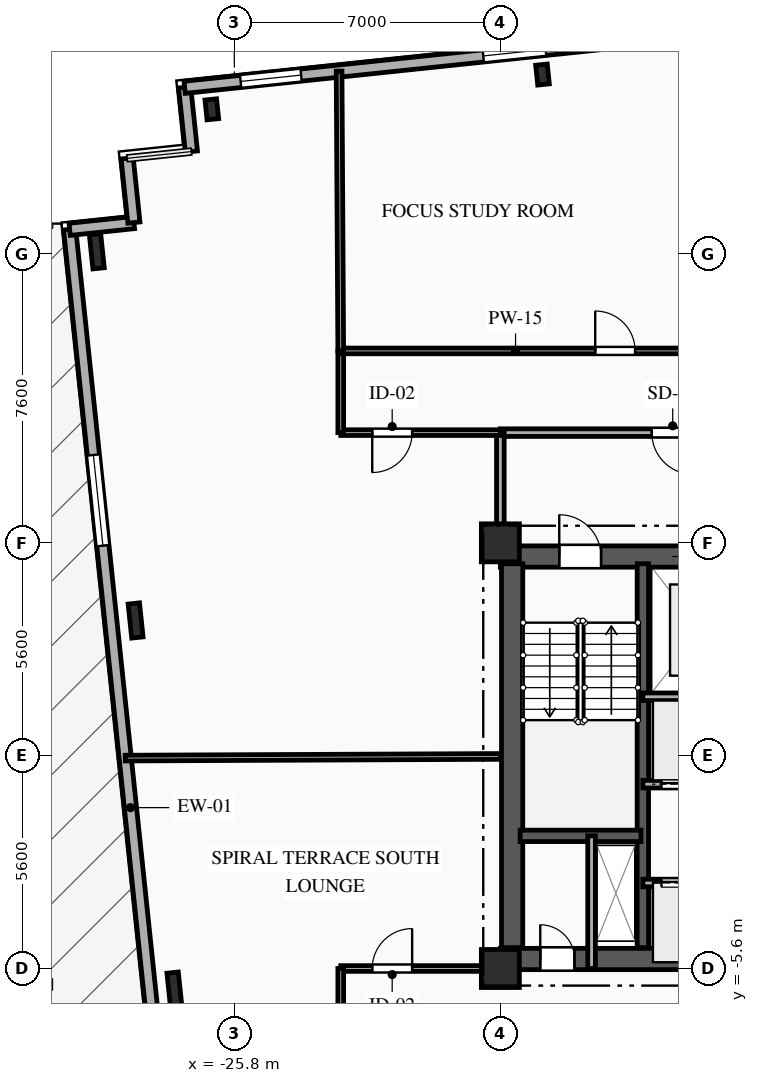
"""IFC4 building model, lengths in metres.
Left out: names, types, materials, properties, quantities, classifications, styles, units other than length and angle.
Written with IfcOpenShell. Run it as: python <this file> out.ifc"""

import sys

from ifc_helpers import new_model, si_unit, direction, frame, frame_2d, origin, origin_2d, place, context, subcontext, project, spatial, rectangle, i_section, extrude, element, fill, save


model = new_model("IFC4")
c1 = context("Model", 3, precision=1e-05, world=origin(), true_north=direction((0.0, 1.0)))
c2 = subcontext(c1, "Body", "Model", "MODEL_VIEW")
j1 = project(units=[si_unit("LENGTHUNIT", "METRE"), si_unit("PLANEANGLEUNIT", "RADIAN")], contexts=[c1])
p1 = place(None, origin())
s1 = spatial("IfcSite", under=j1, at=p1, CompositionType="ELEMENT")
p2 = place(p1, origin())
s2 = spatial("IfcBuilding", under=s1, at=p2, CompositionType="ELEMENT")
p3 = place(p2, frame((0.0, 0.0, 79.0)))
s3 = spatial("IfcBuildingStorey", under=s2, at=p3, CompositionType="ELEMENT", Elevation=79.0)
for number, where, z_axis, x_axis in (
    (1, (-18.8, -5.6, 0.0), (0.0, 0.0, 1.0), (1.0, 0.0, 0.0)),
    (2, (-18.8, 5.6, 0.0), (0.0, 0.0, 1.0), (1.0, 0.0, 0.0)),
):
    element("IfcColumn", number, at=place(p3, frame(where, z_axis=z_axis, x_axis=x_axis)), inside=s3, PredefinedType="COLUMN", context=c2, shape_type="SweptSolid", body=[
        extrude(rectangle(XDim=1.0, YDim=1.0, at=origin_2d()), origin(), (0.0, 0.0, 1.0), 3.35),
    ])
for number, where, z_axis, x_axis in (
    (3, (-17.691, 17.922, 0.0), (0.0, 0.0, 1.0), (0.995, 0.105, 0.0)),
    (4, (-26.393, 17.007, 0.0), (0.0, 0.0, 1.0), (0.995, 0.105, 0.0)),
):
    element("IfcColumn", number, at=place(p3, frame(where, z_axis=z_axis, x_axis=x_axis)), inside=s3, PredefinedType="COLUMN", context=c2, shape_type="SweptSolid", body=[
        extrude(i_section(OverallWidth=0.306, OverallDepth=0.524, WebThickness=0.021, FlangeThickness=0.04, FilletRadius=0.027, at=origin_2d()), origin(), (0.0, 0.0, 1.0), 3.35),
    ])
for number, where, z_axis, x_axis in (
    (5, (-29.419, 13.271, 0.0), (0.0, 0.0, 1.0), (0.995, 0.105, 0.0)),
    (6, (-28.398, 3.557, 0.0), (0.0, 0.0, 1.0), (0.995, 0.105, 0.0)),
    (7, (-27.377, -6.156, 0.0), (0.0, 0.0, 1.0), (0.995, 0.105, 0.0)),
):
    element("IfcColumn", number, at=place(p3, frame(where, z_axis=z_axis, x_axis=x_axis)), inside=s3, PredefinedType="COLUMN", context=c2, shape_type="SweptSolid", body=[
        extrude(i_section(OverallWidth=0.3, OverallDepth=0.9, WebThickness=0.019, FlangeThickness=0.035, FilletRadius=0.03, at=origin_2d()), origin(), (0.0, 0.0, 1.0), 3.35),
    ])
p4 = place(p3, frame((-26.935, -16.583, 0.0), z_axis=(0.0, 0.0, 1.0), x_axis=(-0.104524887486, 0.994522271192, 0.0)))
e8 = element("IfcWall", 8, at=p4, inside=s3, PredefinedType="SOLIDWALL", context=c2, shape_type="SweptSolid", body=[
    extrude(rectangle(XDim=30.6, YDim=0.32, at=frame_2d((15.3, 0.0))), origin(), (0.0, 0.0, 1.0), 3.045),
])
p5 = place(p4, frame((1.65, 0.0, 0.0)))
e9 = element("IfcOpeningElement", 9, at=p5, cuts=e8, PredefinedType="OPENING", context=c2, shape_type="SweptSolid", body=[
    extrude(rectangle(XDim=1.2, YDim=2.2, at=frame_2d((0.6, 1.1))), frame((0.0, 0.17, 0.0), z_axis=(0.0, -1.0, 0.0), x_axis=(1.0, 0.0, 0.0)), (0.0, 0.0, 1.0), 0.34),
])
p6 = place(p4, frame((7.371, 0.0, 0.85)))
e10 = element("IfcOpeningElement", 10, at=p6, cuts=e8, PredefinedType="OPENING", context=c2, shape_type="SweptSolid", body=[
    extrude(rectangle(XDim=2.4, YDim=1.95, at=frame_2d((1.2, 0.975))), frame((0.0, 0.17, 0.0), z_axis=(0.0, -1.0, 0.0), x_axis=(1.0, 0.0, 0.0)), (0.0, 0.0, 1.0), 0.34),
])
p7 = place(p4, frame((22.231, 0.0, 0.85)))
e11 = element("IfcOpeningElement", 11, at=p7, cuts=e8, PredefinedType="OPENING", context=c2, shape_type="SweptSolid", body=[
    extrude(rectangle(XDim=2.4, YDim=1.95, at=frame_2d((1.2, 0.975))), frame((0.0, 0.17, 0.0), z_axis=(0.0, -1.0, 0.0), x_axis=(1.0, 0.0, 0.0)), (0.0, 0.0, 1.0), 0.34),
])
for number, where, z_axis, x_axis in (
    (12, (-30.133, 13.849, 0.0), (0.0, 0.0, 1.0), (0.995, 0.104, 0.0)),
    (13, (-28.443, 14.027, 0.0), (0.0, 0.0, 1.0), (-0.105, 0.995, 0.0)),
    (14, (-26.93, 15.895, 0.0), (0.0, 0.0, 1.0), (-0.105, 0.995, 0.0)),
):
    element("IfcWall", number, at=place(p3, frame(where, z_axis=z_axis, x_axis=x_axis)), inside=s3, PredefinedType="SOLIDWALL", context=c2, shape_type="SweptSolid", body=[
        extrude(rectangle(XDim=1.7, YDim=0.32, at=frame_2d((0.85, 0.0))), origin(), (0.0, 0.0, 1.0), 3.045),
    ])
p8 = place(p3, frame((-27.107, 17.586, 0.0), z_axis=(0.0, 0.0, 1.0), x_axis=(0.994521628355, 0.104531003701, 0.0)))
e15 = element("IfcWall", 15, at=p8, inside=s3, PredefinedType="SOLIDWALL", context=c2, shape_type="SweptSolid", body=[
    extrude(rectangle(XDim=53.8, YDim=0.32, at=frame_2d((26.9, 0.0))), origin(), (0.0, 0.0, 1.0), 3.045),
])
p9 = place(p8, frame((1.482, 0.0, 0.85)))
e16 = element("IfcOpeningElement", 16, at=p9, cuts=e15, PredefinedType="OPENING", context=c2, shape_type="SweptSolid", body=[
    extrude(rectangle(XDim=1.6, YDim=1.85, at=frame_2d((0.8, 0.925))), frame((0.0, 0.17, 0.0), z_axis=(0.0, -1.0, 0.0), x_axis=(1.0, 0.0, 0.0)), (0.0, 0.0, 1.0), 0.34),
])
p10 = place(p8, frame((7.902, 0.0, 0.85)))
e17 = element("IfcOpeningElement", 17, at=p10, cuts=e15, PredefinedType="OPENING", context=c2, shape_type="SweptSolid", body=[
    extrude(rectangle(XDim=1.65, YDim=1.85, at=frame_2d((0.825, 0.925))), frame((0.0, 0.17, 0.0), z_axis=(0.0, -1.0, 0.0), x_axis=(1.0, 0.0, 0.0)), (0.0, 0.0, 1.0), 0.34),
])
p11 = place(p8, frame((18.374, 0.0, 0.85)))
e18 = element("IfcOpeningElement", 18, at=p11, cuts=e15, PredefinedType="OPENING", context=c2, shape_type="SweptSolid", body=[
    extrude(rectangle(XDim=1.6, YDim=1.85, at=frame_2d((0.8, 0.925))), frame((0.0, 0.17, 0.0), z_axis=(0.0, -1.0, 0.0), x_axis=(1.0, 0.0, 0.0)), (0.0, 0.0, 1.0), 0.34),
])
p12 = place(p8, frame((26.16, 0.0, 0.85)))
e19 = element("IfcOpeningElement", 19, at=p12, cuts=e15, PredefinedType="OPENING", context=c2, shape_type="SweptSolid", body=[
    extrude(rectangle(XDim=2.2, YDim=1.85, at=frame_2d((1.1, 0.925))), frame((0.0, 0.17, 0.0), z_axis=(0.0, -1.0, 0.0), x_axis=(1.0, 0.0, 0.0)), (0.0, 0.0, 1.0), 0.34),
])
p13 = place(p8, frame((35.407, 0.0, 0.85)))
e20 = element("IfcOpeningElement", 20, at=p13, cuts=e15, PredefinedType="OPENING", context=c2, shape_type="SweptSolid", body=[
    extrude(rectangle(XDim=2.2, YDim=1.85, at=frame_2d((1.1, 0.925))), frame((0.0, 0.17, 0.0), z_axis=(0.0, -1.0, 0.0), x_axis=(1.0, 0.0, 0.0)), (0.0, 0.0, 1.0), 0.34),
])
p14 = place(p8, frame((42.607, 0.0, 0.85)))
e21 = element("IfcOpeningElement", 21, at=p14, cuts=e15, PredefinedType="OPENING", context=c2, shape_type="SweptSolid", body=[
    extrude(rectangle(XDim=1.65, YDim=1.85, at=frame_2d((0.825, 0.925))), frame((0.0, 0.17, 0.0), z_axis=(0.0, -1.0, 0.0), x_axis=(1.0, 0.0, 0.0)), (0.0, 0.0, 1.0), 0.34),
])
p15 = place(p8, frame((47.211, 0.0, 0.85)))
e22 = element("IfcOpeningElement", 22, at=p15, cuts=e15, PredefinedType="OPENING", context=c2, shape_type="SweptSolid", body=[
    extrude(rectangle(XDim=1.65, YDim=1.85, at=frame_2d((0.825, 0.925))), frame((0.0, 0.17, 0.0), z_axis=(0.0, -1.0, 0.0), x_axis=(1.0, 0.0, 0.0)), (0.0, 0.0, 1.0), 0.34),
])
p16 = place(p3, frame((-18.8, 5.24, 0.0), z_axis=(0.0, 0.0, 1.0), x_axis=(1.0, 0.0, 0.0)))
e23 = element("IfcWall", 23, at=p16, inside=s3, PredefinedType="SHEAR", context=c2, shape_type="SweptSolid", body=[
    extrude(rectangle(XDim=9.6, YDim=0.56, at=frame_2d((4.8, 0.0))), origin(), (0.0, 0.0, 1.0), 3.045),
])
p17 = place(p16, frame((1.55, 0.0, 0.0)))
e24 = element("IfcOpeningElement", 24, at=p17, cuts=e23, PredefinedType="OPENING", context=c2, shape_type="SweptSolid", body=[
    extrude(rectangle(XDim=1.1, YDim=2.15, at=frame_2d((0.55, 1.075))), frame((0.0, 0.29, 0.0), z_axis=(0.0, -1.0, 0.0), x_axis=(1.0, 0.0, 0.0)), (0.0, 0.0, 1.0), 0.58),
])
p18 = place(p16, frame((4.775, 0.0, 0.0)))
e25 = element("IfcOpeningElement", 25, at=p18, cuts=e23, PredefinedType="OPENING", context=c2, shape_type="SweptSolid", body=[
    extrude(rectangle(XDim=1.05, YDim=2.1, at=frame_2d((0.525, 1.05))), frame((0.0, 0.29, 0.0), z_axis=(0.0, -1.0, 0.0), x_axis=(1.0, 0.0, 0.0)), (0.0, 0.0, 1.0), 0.58),
])
p19 = place(p3, frame((-18.8, -5.35, 0.0), z_axis=(0.0, 0.0, 1.0), x_axis=(1.0, 0.0, 0.0)))
e26 = element("IfcWall", 26, at=p19, inside=s3, PredefinedType="SHEAR", context=c2, shape_type="SweptSolid", body=[
    extrude(rectangle(XDim=9.6, YDim=0.56, at=frame_2d((4.8, 0.0))), origin(), (0.0, 0.0, 1.0), 3.045),
])
p20 = place(p19, frame((1.05, 0.0, 0.0)))
e27 = element("IfcOpeningElement", 27, at=p20, cuts=e26, PredefinedType="OPENING", context=c2, shape_type="SweptSolid", body=[
    extrude(rectangle(XDim=0.9, YDim=2.1, at=frame_2d((0.45, 1.05))), frame((0.0, 0.29, 0.0), z_axis=(0.0, -1.0, 0.0), x_axis=(1.0, 0.0, 0.0)), (0.0, 0.0, 1.0), 0.58),
])
p21 = place(p3, frame((-18.49, -5.05, 0.0), z_axis=(0.0, 0.0, 1.0), x_axis=(0.0, 1.0, 0.0)))
e28 = element("IfcWall", 28, at=p21, inside=s3, PredefinedType="SHEAR", context=c2, shape_type="SweptSolid", body=[
    extrude(rectangle(XDim=10.1, YDim=0.56, at=frame_2d((5.05, 0.0))), origin(), (0.0, 0.0, 1.0), 3.045),
])
p22 = place(p3, frame((-15.05, -5.05, 0.0), z_axis=(0.0, 0.0, 1.0), x_axis=(0.0, 1.0, 0.0)))
e29 = element("IfcWall", 29, at=p22, inside=s3, PredefinedType="SHEAR", context=c2, shape_type="SweptSolid", body=[
    extrude(rectangle(XDim=10.1, YDim=0.3, at=frame_2d((5.05, 0.0))), origin(), (0.0, 0.0, 1.0), 3.045),
])
p23 = place(p3, frame((-18.28, -2.11, 0.0), z_axis=(0.0, 0.0, 1.0), x_axis=(1.0, 0.0, 0.0)))
e30 = element("IfcWall", 30, at=p23, inside=s3, PredefinedType="SHEAR", context=c2, shape_type="SweptSolid", body=[
    extrude(rectangle(XDim=3.18, YDim=0.3, at=frame_2d((1.59, 0.0))), origin(), (0.0, 0.0, 1.0), 3.045),
])
p24 = place(p3, frame((-16.4, -5.6, 0.0), z_axis=(0.0, 0.0, 1.0), x_axis=(0.0, 1.0, 0.0)))
e31 = element("IfcWall", 31, at=p24, inside=s3, PredefinedType="PARTITIONING", context=c2, shape_type="SweptSolid", body=[
    extrude(rectangle(XDim=3.49, YDim=0.2, at=frame_2d((1.745, 0.0))), origin(), (0.0, 0.0, 1.0), 3.045),
])
p25 = place(p3, frame((-12.0, 8.5, 0.0), z_axis=(0.0, 0.0, 1.0), x_axis=(-1.0, 0.0, 0.0)))
e32 = element("IfcWall", 32, at=p25, inside=s3, PredefinedType="PARTITIONING", context=c2, shape_type="SweptSolid", body=[
    extrude(rectangle(XDim=6.8, YDim=0.2, at=frame_2d((3.4, 0.0))), origin(), (0.0, 0.0, 1.0), 3.045),
])
p26 = place(p25, frame((1.715, 0.0, 0.0)))
e33 = element("IfcOpeningElement", 33, at=p26, cuts=e32, PredefinedType="OPENING", context=c2, shape_type="SweptSolid", body=[
    extrude(rectangle(XDim=1.1, YDim=2.15, at=frame_2d((0.55, 1.075))), frame((0.0, 0.11, 0.0), z_axis=(0.0, -1.0, 0.0), x_axis=(1.0, 0.0, 0.0)), (0.0, 0.0, 1.0), 0.22),
])
p27 = place(p3, frame((-18.8, 8.5, 0.0), z_axis=(0.0, 0.0, 1.0), x_axis=(0.0, -1.0, 0.0)))
e34 = element("IfcWall", 34, at=p27, inside=s3, PredefinedType="PARTITIONING", context=c2, shape_type="SweptSolid", body=[
    extrude(rectangle(XDim=2.9, YDim=0.2, at=frame_2d((1.45, 0.0))), origin(), (0.0, 0.0, 1.0), 2.53),
])
p28 = place(p3, frame((-15.05, -3.35, 0.0), z_axis=(0.0, 0.0, 1.0), x_axis=(1.0, 0.0, 0.0)))
e35 = element("IfcWall", 35, at=p28, inside=s3, PredefinedType="PARTITIONING", context=c2, shape_type="SweptSolid", body=[
    extrude(rectangle(XDim=2.03, YDim=0.2, at=frame_2d((1.015, 0.0))), origin(), (0.0, 0.0, 1.0), 3.045),
])
p29 = place(p28, frame((0.49, 0.0, 0.0)))
e36 = element("IfcOpeningElement", 36, at=p29, cuts=e35, PredefinedType="OPENING", context=c2, shape_type="SweptSolid", body=[
    extrude(rectangle(XDim=1.05, YDim=2.1, at=frame_2d((0.525, 1.05))), frame((0.0, 0.11, 0.0), z_axis=(0.0, -1.0, 0.0), x_axis=(1.0, 0.0, 0.0)), (0.0, 0.0, 1.0), 0.22),
])
p30 = place(p3, frame((-13.02, -0.75, 0.0), z_axis=(0.0, 0.0, 1.0), x_axis=(-1.0, 0.0, 0.0)))
e37 = element("IfcWall", 37, at=p30, inside=s3, PredefinedType="PARTITIONING", context=c2, shape_type="SweptSolid", body=[
    extrude(rectangle(XDim=2.03, YDim=0.2, at=frame_2d((1.015, 0.0))), origin(), (0.0, 0.0, 1.0), 3.045),
])
p31 = place(p30, frame((0.49, 0.0, 0.0)))
e38 = element("IfcOpeningElement", 38, at=p31, cuts=e37, PredefinedType="OPENING", context=c2, shape_type="SweptSolid", body=[
    extrude(rectangle(XDim=1.05, YDim=2.1, at=frame_2d((0.525, 1.05))), frame((0.0, 0.11, 0.0), z_axis=(0.0, -1.0, 0.0), x_axis=(1.0, 0.0, 0.0)), (0.0, 0.0, 1.0), 0.22),
])
p32 = place(p3, frame((-18.8, 8.5, 0.0), z_axis=(0.0, 0.0, 1.0), x_axis=(-1.0, 0.0, 0.0)))
e39 = element("IfcWall", 39, at=p32, inside=s3, PredefinedType="PARTITIONING", context=c2, shape_type="SweptSolid", body=[
    extrude(rectangle(XDim=4.2, YDim=0.15, at=frame_2d((2.1, 0.0))), origin(), (0.0, 0.0, 1.0), 3.045),
])
p33 = place(p32, frame((2.321, 0.0, 0.0)))
e40 = element("IfcOpeningElement", 40, at=p33, cuts=e39, PredefinedType="OPENING", context=c2, shape_type="SweptSolid", body=[
    extrude(rectangle(XDim=1.05, YDim=2.15, at=frame_2d((0.525, 1.075))), frame((0.0, 0.085, 0.0), z_axis=(0.0, -1.0, 0.0), x_axis=(1.0, 0.0, 0.0)), (0.0, 0.0, 1.0), 0.17),
])
p34 = place(p3, frame((-23.0, 8.5, 0.0), z_axis=(0.0, 0.0, 1.0), x_axis=(0.0, 1.0, 0.0)))
e41 = element("IfcWall", 41, at=p34, inside=s3, PredefinedType="PARTITIONING", context=c2, shape_type="SweptSolid", body=[
    extrude(rectangle(XDim=2.15, YDim=0.15, at=frame_2d((1.075, 0.0))), origin(), (0.0, 0.0, 1.0), 3.045),
])
p35 = place(p3, frame((-23.0, 10.65, 0.0), z_axis=(0.0, 0.0, 1.0), x_axis=(1.0, 0.0, 0.0)))
e42 = element("IfcWall", 42, at=p35, inside=s3, PredefinedType="PARTITIONING", context=c2, shape_type="SweptSolid", body=[
    extrude(rectangle(XDim=9.2, YDim=0.15, at=frame_2d((4.6, 0.0))), origin(), (0.0, 0.0, 1.0), 3.045),
])
p36 = place(p35, frame((6.696, 0.0, 0.0)))
e43 = element("IfcOpeningElement", 43, at=p36, cuts=e42, PredefinedType="OPENING", context=c2, shape_type="SweptSolid", body=[
    extrude(rectangle(XDim=1.05, YDim=2.15, at=frame_2d((0.525, 1.075))), frame((0.0, 0.085, 0.0), z_axis=(0.0, -1.0, 0.0), x_axis=(1.0, 0.0, 0.0)), (0.0, 0.0, 1.0), 0.17),
])
p37 = place(p3, frame((-23.0, -5.6, 0.0), z_axis=(0.0, 0.0, 1.0), x_axis=(1.0, 0.0, 0.0)))
e44 = element("IfcWall", 44, at=p37, inside=s3, PredefinedType="PARTITIONING", context=c2, shape_type="SweptSolid", body=[
    extrude(rectangle(XDim=4.2, YDim=0.15, at=frame_2d((2.1, 0.0))), origin(), (0.0, 0.0, 1.0), 3.045),
])
p38 = place(p37, frame((0.829, 0.0, 0.0)))
e45 = element("IfcOpeningElement", 45, at=p38, cuts=e44, PredefinedType="OPENING", context=c2, shape_type="SweptSolid", body=[
    extrude(rectangle(XDim=1.05, YDim=2.15, at=frame_2d((0.525, 1.075))), frame((0.0, 0.085, 0.0), z_axis=(0.0, -1.0, 0.0), x_axis=(1.0, 0.0, 0.0)), (0.0, 0.0, 1.0), 0.17),
])
p39 = place(p3, frame((-23.0, -7.75, 0.0), z_axis=(0.0, 0.0, 1.0), x_axis=(0.0, 1.0, 0.0)))
e46 = element("IfcWall", 46, at=p39, inside=s3, PredefinedType="PARTITIONING", context=c2, shape_type="SweptSolid", body=[
    extrude(rectangle(XDim=2.15, YDim=0.15, at=frame_2d((1.075, 0.0))), origin(), (0.0, 0.0, 1.0), 2.7),
])
p40 = place(p3, frame((-28.671, -0.064, 0.0), z_axis=(0.0, 0.0, 1.0), x_axis=(0.999990089865, 0.004451985263, 0.0)))
e47 = element("IfcWall", 47, at=p40, inside=s3, PredefinedType="PARTITIONING", context=c2, shape_type="SweptSolid", body=[
    extrude(rectangle(XDim=9.871, YDim=0.15, at=frame_2d((4.936, 0.0))), origin(), (0.0, 0.0, 1.0), 3.045),
])
p41 = place(p3, frame((-23.044, 18.013, 0.0), z_axis=(0.0, 0.0, 1.0), x_axis=(0.005968459246, -0.999982188588, 0.0)))
e48 = element("IfcWall", 48, at=p41, inside=s3, PredefinedType="PARTITIONING", context=c2, shape_type="SweptSolid", body=[
    extrude(rectangle(XDim=7.363, YDim=0.15, at=frame_2d((3.682, 0.0))), origin(), (0.0, 0.0, 1.0), 3.045),
])
p42 = place(p3, frame((-15.05, 1.55, 0.0), z_axis=(0.0, 0.0, 1.0), x_axis=(1.0, 0.0, 0.0)))
e49 = element("IfcWall", 49, at=p42, inside=s3, PredefinedType="PARTITIONING", context=c2, shape_type="SweptSolid", body=[
    extrude(rectangle(XDim=5.85, YDim=0.2, at=frame_2d((2.925, 0.0))), origin(), (0.0, 0.0, 1.0), 3.045),
])
p43 = place(p7, origin())
e50 = element("IfcWindow", 50, at=p43, inside=s3, PartitioningType="SINGLE_PANEL", PredefinedType="WINDOW", context=c2, shape_type="SweptSolid", body=[
    extrude(rectangle(XDim=2.4, YDim=1.95, at=frame_2d((1.2, 0.975))), frame((0.0, 0.03, 0.0), z_axis=(0.0, -1.0, 0.0), x_axis=(1.0, 0.0, 0.0)), (0.0, 0.0, 1.0), 0.06),
])
fill(e11, e50)
p44 = place(p9, origin())
e51 = element("IfcWindow", 51, at=p44, inside=s3, PartitioningType="SINGLE_PANEL", PredefinedType="WINDOW", context=c2, shape_type="SweptSolid", body=[
    extrude(rectangle(XDim=1.6, YDim=1.85, at=frame_2d((0.8, 0.925))), frame((0.0, 0.03, 0.0), z_axis=(0.0, -1.0, 0.0), x_axis=(1.0, 0.0, 0.0)), (0.0, 0.0, 1.0), 0.06),
])
fill(e16, e51)
p45 = place(p10, origin())
e52 = element("IfcWindow", 52, at=p45, inside=s3, PartitioningType="SINGLE_PANEL", PredefinedType="WINDOW", context=c2, shape_type="SweptSolid", body=[
    extrude(rectangle(XDim=1.65, YDim=1.85, at=frame_2d((0.825, 0.925))), frame((0.0, 0.03, 0.0), z_axis=(0.0, -1.0, 0.0), x_axis=(1.0, 0.0, 0.0)), (0.0, 0.0, 1.0), 0.06),
])
fill(e17, e52)
p46 = place(p17, origin())
e53 = element("IfcDoor", 53, at=p46, inside=s3, OperationType="SINGLE_SWING_LEFT", PredefinedType="DOOR", context=c2, shape_type="SweptSolid", body=[
    extrude(rectangle(XDim=1.1, YDim=2.15, at=frame_2d((0.55, 1.075))), frame((0.0, 0.025, 0.0), z_axis=(0.0, -1.0, 0.0), x_axis=(1.0, 0.0, 0.0)), (0.0, 0.0, 1.0), 0.05),
])
fill(e24, e53)
p47 = place(p20, origin())
e54 = element("IfcDoor", 54, at=p47, inside=s3, OperationType="SINGLE_SWING_LEFT", PredefinedType="DOOR", context=c2, shape_type="SweptSolid", body=[
    extrude(rectangle(XDim=0.9, YDim=2.1, at=frame_2d((0.45, 1.05))), frame((0.0, 0.025, 0.0), z_axis=(0.0, -1.0, 0.0), x_axis=(1.0, 0.0, 0.0)), (0.0, 0.0, 1.0), 0.05),
])
fill(e27, e54)
p48 = place(p26, origin())
e55 = element("IfcDoor", 55, at=p48, inside=s3, OperationType="SINGLE_SWING_LEFT", PredefinedType="DOOR", context=c2, shape_type="SweptSolid", body=[
    extrude(rectangle(XDim=1.1, YDim=2.15, at=frame_2d((0.55, 1.075))), frame((0.0, 0.025, 0.0), z_axis=(0.0, -1.0, 0.0), x_axis=(1.0, 0.0, 0.0)), (0.0, 0.0, 1.0), 0.05),
])
fill(e33, e55)
p49 = place(p29, origin())
e56 = element("IfcDoor", 56, at=p49, inside=s3, OperationType="DOUBLE_DOOR_SLIDING", PredefinedType="DOOR", context=c2, shape_type="SweptSolid", body=[
    extrude(rectangle(XDim=1.05, YDim=2.1, at=frame_2d((0.525, 1.05))), frame((0.0, 0.025, 0.0), z_axis=(0.0, -1.0, 0.0), x_axis=(1.0, 0.0, 0.0)), (0.0, 0.0, 1.0), 0.05),
])
fill(e36, e56)
p50 = place(p31, origin())
e57 = element("IfcDoor", 57, at=p50, inside=s3, OperationType="DOUBLE_DOOR_SLIDING", PredefinedType="DOOR", context=c2, shape_type="SweptSolid", body=[
    extrude(rectangle(XDim=1.05, YDim=2.1, at=frame_2d((0.525, 1.05))), frame((0.0, 0.025, 0.0), z_axis=(0.0, -1.0, 0.0), x_axis=(1.0, 0.0, 0.0)), (0.0, 0.0, 1.0), 0.05),
])
fill(e38, e57)
p51 = place(p33, origin())
e58 = element("IfcDoor", 58, at=p51, inside=s3, OperationType="SINGLE_SWING_RIGHT", PredefinedType="DOOR", context=c2, shape_type="SweptSolid", body=[
    extrude(rectangle(XDim=1.05, YDim=2.15, at=frame_2d((0.525, 1.075))), frame((0.0, 0.025, 0.0), z_axis=(0.0, -1.0, 0.0), x_axis=(1.0, 0.0, 0.0)), (0.0, 0.0, 1.0), 0.05),
])
fill(e40, e58)
p52 = place(p36, origin())
e59 = element("IfcDoor", 59, at=p52, inside=s3, OperationType="SINGLE_SWING_LEFT", PredefinedType="DOOR", context=c2, shape_type="SweptSolid", body=[
    extrude(rectangle(XDim=1.05, YDim=2.15, at=frame_2d((0.525, 1.075))), frame((0.0, 0.025, 0.0), z_axis=(0.0, -1.0, 0.0), x_axis=(1.0, 0.0, 0.0)), (0.0, 0.0, 1.0), 0.05),
])
fill(e43, e59)
p53 = place(p38, origin())
e60 = element("IfcDoor", 60, at=p53, inside=s3, OperationType="SINGLE_SWING_RIGHT", PredefinedType="DOOR", context=c2, shape_type="SweptSolid", body=[
    extrude(rectangle(XDim=1.05, YDim=2.15, at=frame_2d((0.525, 1.075))), frame((0.0, 0.025, 0.0), z_axis=(0.0, -1.0, 0.0), x_axis=(1.0, 0.0, 0.0)), (0.0, 0.0, 1.0), 0.05),
])
fill(e45, e60)
save(model, sys.argv[1])
